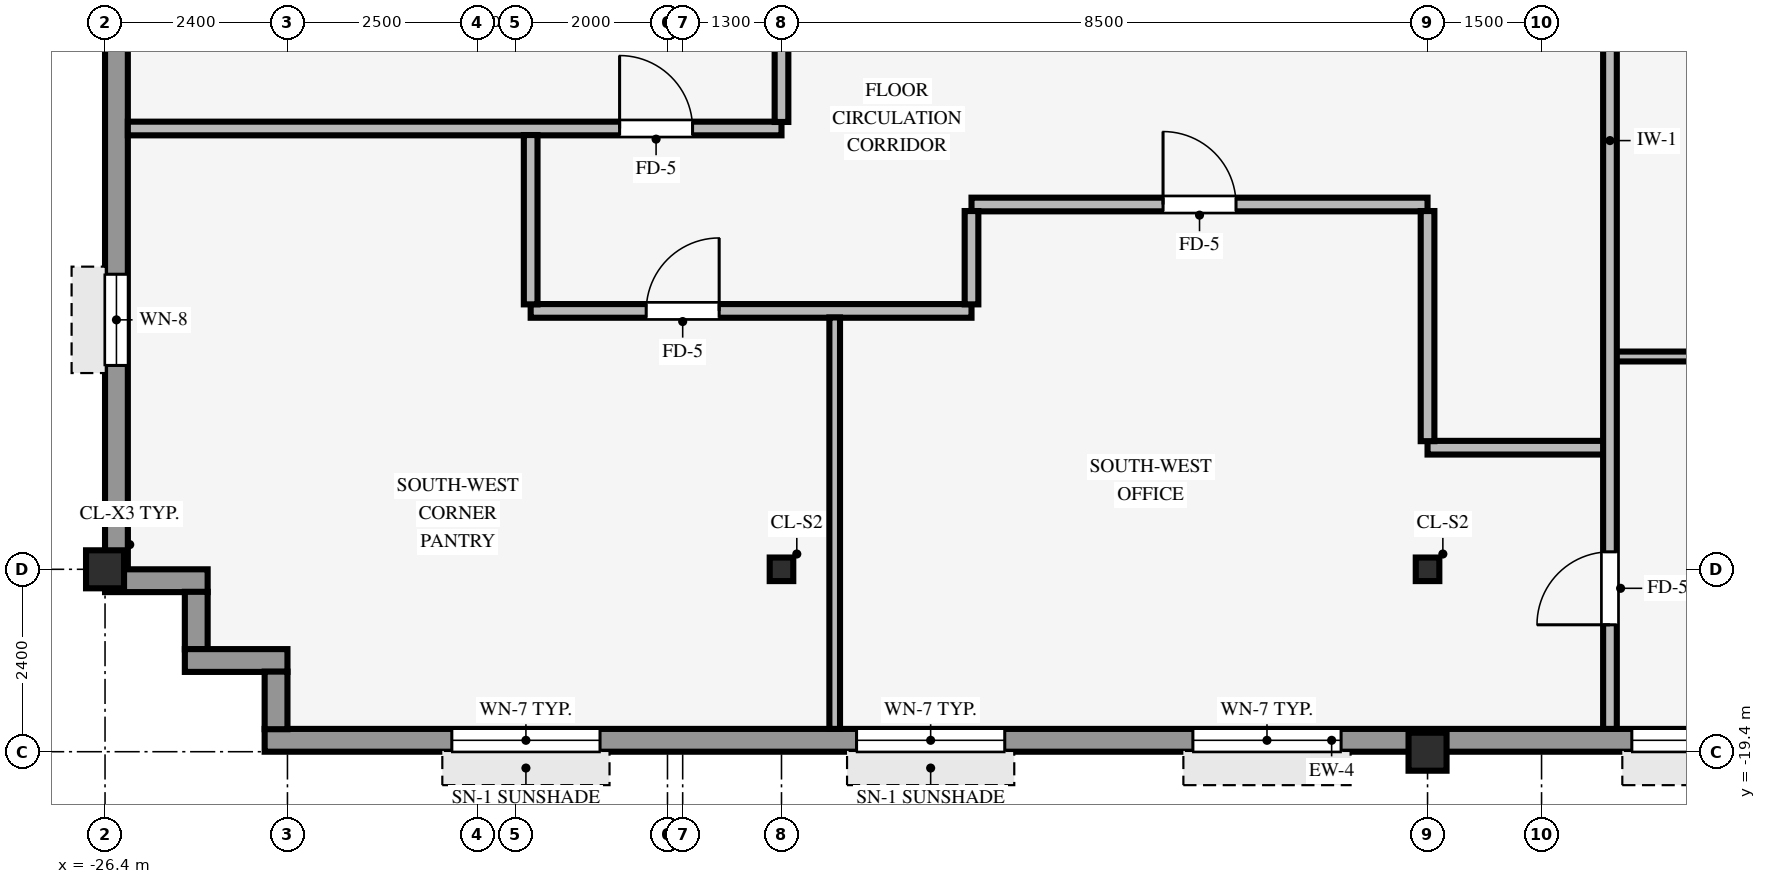
"""IFC4 building model, lengths in metres.
Left out: names, types, materials, properties, quantities, classifications, styles, units other than length and angle.
Written with IfcOpenShell. Run it as: python <this file> out.ifc"""

import sys

from ifc_helpers import new_model, si_unit, direction, frame, frame_2d, origin, origin_2d, place, context, subcontext, project, spatial, rectangle, hollow_rectangle, i_section, extrude, source, transform, mapped, element, fill, save


model = new_model("IFC4")
c1 = context("Model", 3, precision=1e-05, world=origin(), true_north=direction((0.0, 1.0)))
c2 = subcontext(c1, "Body", "Model", "MODEL_VIEW")
j1 = project(units=[si_unit("LENGTHUNIT", "METRE"), si_unit("PLANEANGLEUNIT", "RADIAN")], contexts=[c1])
p1 = place(None, origin())
s1 = spatial("IfcSite", under=j1, at=p1, CompositionType="ELEMENT")
p2 = place(p1, origin())
s2 = spatial("IfcBuilding", under=s1, at=p2, CompositionType="ELEMENT")
p3 = place(p2, frame((0.0, 0.0, 231.05)))
s3 = spatial("IfcBuildingStorey", under=s2, at=p3, CompositionType="ELEMENT", Elevation=231.05)
for number, where, z_axis, x_axis in (
    (1, (-26.4, -17.0, 0.0), (0.0, 0.0, 1.0), (1.0, 0.0, 0.0)),
    (2, (-9.0, -19.4, 0.0), (0.0, 0.0, 1.0), (1.0, 0.0, 0.0)),
):
    element("IfcColumn", number, at=place(p3, frame(where, z_axis=z_axis, x_axis=x_axis)), inside=s3, PredefinedType="COLUMN", context=c2, shape_type="SweptSolid", body=[
        extrude(hollow_rectangle(XDim=0.5, YDim=0.5, WallThickness=0.032, InnerFilletRadius=0.032, OuterFilletRadius=0.064, at=origin_2d()), origin(), (0.0, 0.0, 1.0), 3.37),
    ])
for number, where, z_axis, x_axis in (
    (3, (-17.5, -17.0, 0.0), (0.0, 0.0, 1.0), (1.0, 0.0, 0.0)),
    (4, (-9.0, -17.0, 0.0), (0.0, 0.0, 1.0), (1.0, 0.0, 0.0)),
):
    element("IfcColumn", number, at=place(p3, frame(where, z_axis=z_axis, x_axis=x_axis)), inside=s3, PredefinedType="COLUMN", context=c2, shape_type="SweptSolid", body=[
        extrude(i_section(OverallWidth=0.31, OverallDepth=0.31, WebThickness=0.015, FlangeThickness=0.015, FilletRadius=0.015, at=origin_2d()), origin(), (0.0, 0.0, 1.0), 3.37),
    ])
p4 = place(p3, frame((-24.3, -19.25, 0.0), z_axis=(0.0, 0.0, 1.0), x_axis=(1.0, 0.0, 0.0)))
e5 = element("IfcWall", 5, at=p4, inside=s3, PredefinedType="STANDARD", context=c2, shape_type="SweptSolid", body=[
    extrude(rectangle(XDim=41.0, YDim=0.3, at=frame_2d((20.5, 0.0))), origin(), (0.0, 0.0, 1.0), 2.705),
])
p5 = place(p4, frame((29.55, 0.0, 0.0), z_axis=(0.0, 0.0, 1.0), x_axis=(-1.0, 0.0, 0.0)))
e6 = element("IfcOpeningElement", 6, at=p5, cuts=e5, PredefinedType="OPENING", context=c2, shape_type="SweptSolid", body=[
    extrude(rectangle(XDim=1.05, YDim=2.1, at=frame_2d((0.525, 1.05))), frame((0.0, 0.16, 0.0), z_axis=(0.0, -1.0, 0.0), x_axis=(1.0, 0.0, 0.0)), (0.0, 0.0, 1.0), 0.32),
])
p6 = place(p4, frame((2.462, 0.0, 0.8)))
e7 = element("IfcOpeningElement", 7, at=p6, cuts=e5, PredefinedType="OPENING", context=c2, shape_type="SweptSolid", body=[
    extrude(rectangle(XDim=1.95, YDim=1.48, at=frame_2d((0.975, 0.74))), frame((0.0, 0.16, 0.0), z_axis=(0.0, -1.0, 0.0), x_axis=(1.0, 0.0, 0.0)), (0.0, 0.0, 1.0), 0.32),
])
p7 = place(p4, frame((7.788, 0.0, 0.8)))
e8 = element("IfcOpeningElement", 8, at=p7, cuts=e5, PredefinedType="OPENING", context=c2, shape_type="SweptSolid", body=[
    extrude(rectangle(XDim=1.95, YDim=1.48, at=frame_2d((0.975, 0.74))), frame((0.0, 0.16, 0.0), z_axis=(0.0, -1.0, 0.0), x_axis=(1.0, 0.0, 0.0)), (0.0, 0.0, 1.0), 0.32),
])
p8 = place(p4, frame((12.212, 0.0, 0.8)))
e9 = element("IfcOpeningElement", 9, at=p8, cuts=e5, PredefinedType="OPENING", context=c2, shape_type="SweptSolid", body=[
    extrude(rectangle(XDim=1.95, YDim=1.48, at=frame_2d((0.975, 0.74))), frame((0.0, 0.16, 0.0), z_axis=(0.0, -1.0, 0.0), x_axis=(1.0, 0.0, 0.0)), (0.0, 0.0, 1.0), 0.32),
])
p9 = place(p4, frame((17.988, 0.0, 0.8)))
e10 = element("IfcOpeningElement", 10, at=p9, cuts=e5, PredefinedType="OPENING", context=c2, shape_type="SweptSolid", body=[
    extrude(rectangle(XDim=1.95, YDim=1.48, at=frame_2d((0.975, 0.74))), frame((0.0, 0.16, 0.0), z_axis=(0.0, -1.0, 0.0), x_axis=(1.0, 0.0, 0.0)), (0.0, 0.0, 1.0), 0.32),
])
p10 = place(p4, frame((21.512, 0.0, 0.8)))
e11 = element("IfcOpeningElement", 11, at=p10, cuts=e5, PredefinedType="OPENING", context=c2, shape_type="SweptSolid", body=[
    extrude(rectangle(XDim=1.95, YDim=1.48, at=frame_2d((0.975, 0.74))), frame((0.0, 0.16, 0.0), z_axis=(0.0, -1.0, 0.0), x_axis=(1.0, 0.0, 0.0)), (0.0, 0.0, 1.0), 0.32),
])
p11 = place(p4, frame((25.938, 0.0, 0.8)))
e12 = element("IfcOpeningElement", 12, at=p11, cuts=e5, PredefinedType="OPENING", context=c2, shape_type="SweptSolid", body=[
    extrude(rectangle(XDim=1.95, YDim=1.48, at=frame_2d((0.975, 0.74))), frame((0.0, 0.16, 0.0), z_axis=(0.0, -1.0, 0.0), x_axis=(1.0, 0.0, 0.0)), (0.0, 0.0, 1.0), 0.32),
])
p12 = place(p4, frame((36.587, 0.0, 0.8)))
e13 = element("IfcOpeningElement", 13, at=p12, cuts=e5, PredefinedType="OPENING", context=c2, shape_type="SweptSolid", body=[
    extrude(rectangle(XDim=1.95, YDim=1.48, at=frame_2d((0.975, 0.74))), frame((0.0, 0.16, 0.0), z_axis=(0.0, -1.0, 0.0), x_axis=(1.0, 0.0, 0.0)), (0.0, 0.0, 1.0), 0.32),
])
p13 = place(p3, frame((-26.25, -17.004, 0.0), z_axis=(0.0, 0.0, 1.0), x_axis=(0.0, 1.0, 0.0)))
e14 = element("IfcWall", 14, at=p13, inside=s3, PredefinedType="STANDARD", context=c2, shape_type="SweptSolid", body=[
    extrude(rectangle(XDim=34.008, YDim=0.3, at=frame_2d((17.004, 0.0))), origin(), (0.0, 0.0, 1.0), 2.705),
])
p14 = place(p13, frame((2.686, 0.0, 0.8)))
e15 = element("IfcOpeningElement", 15, at=p14, cuts=e14, PredefinedType="OPENING", context=c2, shape_type="SweptSolid", body=[
    extrude(rectangle(XDim=1.2, YDim=1.48, at=frame_2d((0.6, 0.74))), frame((0.0, 0.16, 0.0), z_axis=(0.0, -1.0, 0.0), x_axis=(1.0, 0.0, 0.0)), (0.0, 0.0, 1.0), 0.32),
])
p15 = place(p13, frame((8.159, 0.0, 0.8)))
e16 = element("IfcOpeningElement", 16, at=p15, cuts=e14, PredefinedType="OPENING", context=c2, shape_type="SweptSolid", body=[
    extrude(rectangle(XDim=1.2, YDim=1.48, at=frame_2d((0.6, 0.74))), frame((0.0, 0.16, 0.0), z_axis=(0.0, -1.0, 0.0), x_axis=(1.0, 0.0, 0.0)), (0.0, 0.0, 1.0), 0.32),
])
p16 = place(p13, frame((11.831, 0.0, 0.8)))
e17 = element("IfcOpeningElement", 17, at=p16, cuts=e14, PredefinedType="OPENING", context=c2, shape_type="SweptSolid", body=[
    extrude(rectangle(XDim=1.2, YDim=1.48, at=frame_2d((0.6, 0.74))), frame((0.0, 0.16, 0.0), z_axis=(0.0, -1.0, 0.0), x_axis=(1.0, 0.0, 0.0)), (0.0, 0.0, 1.0), 0.32),
])
p17 = place(p13, frame((17.754, 0.0, 0.8)))
e18 = element("IfcOpeningElement", 18, at=p17, cuts=e14, PredefinedType="OPENING", context=c2, shape_type="SweptSolid", body=[
    extrude(rectangle(XDim=1.2, YDim=1.48, at=frame_2d((0.6, 0.74))), frame((0.0, 0.16, 0.0), z_axis=(0.0, -1.0, 0.0), x_axis=(1.0, 0.0, 0.0)), (0.0, 0.0, 1.0), 0.32),
])
p18 = place(p13, frame((20.977, 0.0, 0.8)))
e19 = element("IfcOpeningElement", 19, at=p18, cuts=e14, PredefinedType="OPENING", context=c2, shape_type="SweptSolid", body=[
    extrude(rectangle(XDim=1.2, YDim=1.48, at=frame_2d((0.6, 0.74))), frame((0.0, 0.16, 0.0), z_axis=(0.0, -1.0, 0.0), x_axis=(1.0, 0.0, 0.0)), (0.0, 0.0, 1.0), 0.32),
])
p19 = place(p13, frame((24.649, 0.0, 0.8)))
e20 = element("IfcOpeningElement", 20, at=p19, cuts=e14, PredefinedType="OPENING", context=c2, shape_type="SweptSolid", body=[
    extrude(rectangle(XDim=1.2, YDim=1.48, at=frame_2d((0.6, 0.74))), frame((0.0, 0.16, 0.0), z_axis=(0.0, -1.0, 0.0), x_axis=(1.0, 0.0, 0.0)), (0.0, 0.0, 1.0), 0.32),
])
p20 = place(p13, frame((30.122, 0.0, 0.8)))
e21 = element("IfcOpeningElement", 21, at=p20, cuts=e14, PredefinedType="OPENING", context=c2, shape_type="SweptSolid", body=[
    extrude(rectangle(XDim=1.2, YDim=1.48, at=frame_2d((0.6, 0.74))), frame((0.0, 0.16, 0.0), z_axis=(0.0, -1.0, 0.0), x_axis=(1.0, 0.0, 0.0)), (0.0, 0.0, 1.0), 0.32),
])
p21 = place(p3, frame((-26.4, -17.15, 0.0), z_axis=(0.0, 0.0, 1.0), x_axis=(1.0, 0.0, 0.0)))
e22 = element("IfcWall", 22, at=p21, inside=s3, PredefinedType="STANDARD", context=c2, shape_type="SweptSolid", body=[
    extrude(rectangle(XDim=1.35, YDim=0.3, at=frame_2d((0.675, 0.0))), origin(), (0.0, 0.0, 1.0), 2.892),
])
p22 = place(p3, frame((-25.2, -18.054, 0.0), z_axis=(0.0, 0.0, 1.0), x_axis=(0.0, 1.0, 0.0)))
e23 = element("IfcWall", 23, at=p22, inside=s3, PredefinedType="STANDARD", context=c2, shape_type="SweptSolid", body=[
    extrude(rectangle(XDim=0.758, YDim=0.3, at=frame_2d((0.379, 0.0))), origin(), (0.0, 0.0, 1.0), 2.892),
])
p23 = place(p3, frame((-25.35, -18.2, 0.0), z_axis=(0.0, 0.0, 1.0), x_axis=(1.0, 0.0, 0.0)))
e24 = element("IfcWall", 24, at=p23, inside=s3, PredefinedType="STANDARD", context=c2, shape_type="SweptSolid", body=[
    extrude(rectangle(XDim=1.35, YDim=0.3, at=frame_2d((0.675, 0.0))), origin(), (0.0, 0.0, 1.0), 2.892),
])
p24 = place(p3, frame((-24.15, -19.104, 0.0), z_axis=(0.0, 0.0, 1.0), x_axis=(0.0, 1.0, 0.0)))
e25 = element("IfcWall", 25, at=p24, inside=s3, PredefinedType="STANDARD", context=c2, shape_type="SweptSolid", body=[
    extrude(rectangle(XDim=0.758, YDim=0.3, at=frame_2d((0.379, 0.0))), origin(), (0.0, 0.0, 1.0), 2.892),
])
p25 = place(p3, frame((-9.0, -15.4, 0.0), z_axis=(0.0, 0.0, 1.0), x_axis=(1.0, 0.0, 0.0)))
e26 = element("IfcWall", 26, at=p25, inside=s3, PredefinedType="PARTITIONING", context=c2, shape_type="SweptSolid", body=[
    extrude(rectangle(XDim=2.339, YDim=0.18, at=frame_2d((1.169, 0.0))), origin(), (0.0, 0.0, 1.0), 3.36),
])
p26 = place(p3, frame((-6.539, -14.2, 0.0), z_axis=(0.0, 0.0, 1.0), x_axis=(1.0, 0.0, 0.0)))
e27 = element("IfcWall", 27, at=p26, inside=s3, PredefinedType="PARTITIONING", context=c2, shape_type="SweptSolid", body=[
    extrude(rectangle(XDim=13.078, YDim=0.13, at=frame_2d((6.539, 0.0))), origin(), (0.0, 0.0, 1.0), 3.36),
])
p27 = place(p3, frame((-20.8, -13.6, 0.0), z_axis=(0.0, 0.0, 1.0), x_axis=(1.0, 0.0, 0.0)))
e28 = element("IfcWall", 28, at=p27, inside=s3, PredefinedType="PARTITIONING", context=c2, shape_type="SweptSolid", body=[
    extrude(rectangle(XDim=5.8, YDim=0.18, at=frame_2d((2.9, 0.0))), origin(), (0.0, 0.0, 1.0), 3.049),
])
p28 = place(p27, frame((1.52, 0.0, 0.0)))
e29 = element("IfcOpeningElement", 29, at=p28, cuts=e28, PredefinedType="OPENING", context=c2, shape_type="SweptSolid", body=[
    extrude(rectangle(XDim=0.96, YDim=2.1, at=frame_2d((0.48, 1.05))), frame((0.0, 0.1, 0.0), z_axis=(0.0, -1.0, 0.0), x_axis=(1.0, 0.0, 0.0)), (0.0, 0.0, 1.0), 0.2),
])
p29 = place(p3, frame((-15.0, -12.2, 0.0), z_axis=(0.0, 0.0, 1.0), x_axis=(1.0, 0.0, 0.0)))
e30 = element("IfcWall", 30, at=p29, inside=s3, PredefinedType="PARTITIONING", context=c2, shape_type="SweptSolid", body=[
    extrude(rectangle(XDim=6.0, YDim=0.18, at=frame_2d((3.0, 0.0))), origin(), (0.0, 0.0, 1.0), 3.36),
])
p30 = place(p29, frame((2.52, 0.0, 0.0)))
e31 = element("IfcOpeningElement", 31, at=p30, cuts=e30, PredefinedType="OPENING", context=c2, shape_type="SweptSolid", body=[
    extrude(rectangle(XDim=0.96, YDim=2.1, at=frame_2d((0.48, 1.05))), frame((0.0, 0.1, 0.0), z_axis=(0.0, -1.0, 0.0), x_axis=(1.0, 0.0, 0.0)), (0.0, 0.0, 1.0), 0.2),
])
p31 = place(p3, frame((-26.1, -11.2, 0.0), z_axis=(0.0, 0.0, 1.0), x_axis=(1.0, 0.0, 0.0)))
e32 = element("IfcWall", 32, at=p31, inside=s3, PredefinedType="PARTITIONING", context=c2, shape_type="SweptSolid", body=[
    extrude(rectangle(XDim=8.6, YDim=0.18, at=frame_2d((4.3, 0.0))), origin(), (0.0, 0.0, 1.0), 3.36),
])
p32 = place(p31, frame((6.47, 0.0, 0.0)))
e33 = element("IfcOpeningElement", 33, at=p32, cuts=e32, PredefinedType="OPENING", context=c2, shape_type="SweptSolid", body=[
    extrude(rectangle(XDim=0.96, YDim=2.1, at=frame_2d((0.48, 1.05))), frame((0.0, 0.1, 0.0), z_axis=(0.0, -1.0, 0.0), x_axis=(1.0, 0.0, 0.0)), (0.0, 0.0, 1.0), 0.2),
])
p33 = place(p3, frame((-20.8, -13.514, 0.0), z_axis=(0.0, 0.0, 1.0), x_axis=(0.0, 1.0, 0.0)))
e34 = element("IfcWall", 34, at=p33, inside=s3, PredefinedType="PARTITIONING", context=c2, shape_type="SweptSolid", body=[
    extrude(rectangle(XDim=2.228, YDim=0.18, at=frame_2d((1.114, 0.0))), origin(), (0.0, 0.0, 1.0), 3.36),
])
p34 = place(p3, frame((-17.5, -11.114, 0.0), z_axis=(0.0, 0.0, 1.0), x_axis=(0.0, 1.0, 0.0)))
e35 = element("IfcWall", 35, at=p34, inside=s3, PredefinedType="PARTITIONING", context=c2, shape_type="SweptSolid", body=[
    extrude(rectangle(XDim=1.118, YDim=0.18, at=frame_2d((0.559, 0.0))), origin(), (0.0, 0.0, 1.0), 2.892),
])
p35 = place(p3, frame((-16.8, -19.1, 0.0), z_axis=(0.0, 0.0, 1.0), x_axis=(0.0, 1.0, 0.0)))
e36 = element("IfcWall", 36, at=p35, inside=s3, PredefinedType="PARTITIONING", context=c2, shape_type="SweptSolid", body=[
    extrude(rectangle(XDim=5.414, YDim=0.14, at=frame_2d((2.707, 0.0))), origin(), (0.0, 0.0, 1.0), 3.36),
])
p36 = place(p3, frame((-15.0, -13.514, 0.0), z_axis=(0.0, 0.0, 1.0), x_axis=(0.0, 1.0, 0.0)))
e37 = element("IfcWall", 37, at=p36, inside=s3, PredefinedType="PARTITIONING", context=c2, shape_type="SweptSolid", body=[
    extrude(rectangle(XDim=1.228, YDim=0.18, at=frame_2d((0.614, 0.0))), origin(), (0.0, 0.0, 1.0), 3.36),
])
p37 = place(p3, frame((-9.0, -15.314, 0.0), z_axis=(0.0, 0.0, 1.0), x_axis=(0.0, 1.0, 0.0)))
e38 = element("IfcWall", 38, at=p37, inside=s3, PredefinedType="PARTITIONING", context=c2, shape_type="SweptSolid", body=[
    extrude(rectangle(XDim=3.028, YDim=0.18, at=frame_2d((1.514, 0.0))), origin(), (0.0, 0.0, 1.0), 2.892),
])
p38 = place(p3, frame((-6.6, -19.1, 0.0), z_axis=(0.0, 0.0, 1.0), x_axis=(0.0, 1.0, 0.0)))
e39 = element("IfcWall", 39, at=p38, inside=s3, PredefinedType="PARTITIONING", context=c2, shape_type="SweptSolid", body=[
    extrude(rectangle(XDim=17.764, YDim=0.18, at=frame_2d((8.882, 0.0))), origin(), (0.0, 0.0, 1.0), 3.36),
])
p39 = place(p38, frame((13.152, 0.0, 0.0)))
e40 = element("IfcOpeningElement", 40, at=p39, cuts=e39, PredefinedType="OPENING", context=c2, shape_type="SweptSolid", body=[
    extrude(rectangle(XDim=0.96, YDim=2.1, at=frame_2d((0.48, 1.05))), frame((0.0, 0.1, 0.0), z_axis=(0.0, -1.0, 0.0), x_axis=(1.0, 0.0, 0.0)), (0.0, 0.0, 1.0), 0.2),
])
p40 = place(p38, frame((1.37, 0.0, 0.0)))
e41 = element("IfcOpeningElement", 41, at=p40, cuts=e39, PredefinedType="OPENING", context=c2, shape_type="SweptSolid", body=[
    extrude(rectangle(XDim=0.96, YDim=2.1, at=frame_2d((0.48, 1.05))), frame((0.0, 0.1, 0.0), z_axis=(0.0, -1.0, 0.0), x_axis=(1.0, 0.0, 0.0)), (0.0, 0.0, 1.0), 0.2),
])
m1 = source(origin(), c2, "Body", "SweptSolid", [
    extrude(rectangle(XDim=1.95, YDim=1.48, at=frame_2d((0.975, 0.74))), frame((0.0, 0.03, 0.0), z_axis=(0.0, -1.0, 0.0), x_axis=(1.0, 0.0, 0.0)), (0.0, 0.0, 1.0), 0.06),
])
p41 = place(p6, origin())
e42 = element("IfcWindow", 42, at=p41, inside=s3, PartitioningType="SINGLE_PANEL", PredefinedType="WINDOW", context=c2, shape_type="MappedRepresentation", body=[
    mapped(m1, transform((0.0, 0.0, 0.0), scale=1.0)),
])
fill(e7, e42)
p42 = place(p7, origin())
e43 = element("IfcWindow", 43, at=p42, inside=s3, PartitioningType="SINGLE_PANEL", PredefinedType="WINDOW", context=c2, shape_type="MappedRepresentation", body=[
    mapped(m1, transform((0.0, 0.0, 0.0), scale=1.0)),
])
fill(e8, e43)
p43 = place(p8, origin())
e44 = element("IfcWindow", 44, at=p43, inside=s3, PartitioningType="SINGLE_PANEL", PredefinedType="WINDOW", context=c2, shape_type="MappedRepresentation", body=[
    mapped(m1, transform((0.0, 0.0, 0.0), scale=1.0)),
])
fill(e9, e44)
p44 = place(p9, origin())
e45 = element("IfcWindow", 45, at=p44, inside=s3, PartitioningType="SINGLE_PANEL", PredefinedType="WINDOW", context=c2, shape_type="MappedRepresentation", body=[
    mapped(m1, transform((0.0, 0.0, 0.0), scale=1.0)),
])
fill(e10, e45)
m2 = source(origin(), c2, "Body", "SweptSolid", [
    extrude(rectangle(XDim=1.2, YDim=1.48, at=frame_2d((0.6, 0.74))), frame((0.0, 0.03, 0.0), z_axis=(0.0, -1.0, 0.0), x_axis=(1.0, 0.0, 0.0)), (0.0, 0.0, 1.0), 0.06),
])
p45 = place(p14, origin())
e46 = element("IfcWindow", 46, at=p45, inside=s3, PartitioningType="SINGLE_PANEL", PredefinedType="WINDOW", context=c2, shape_type="MappedRepresentation", body=[
    mapped(m2, transform((0.0, 0.0, 0.0), scale=1.0)),
])
fill(e15, e46)
m3 = source(origin(), c2, "Body", "SweptSolid", [
    extrude(rectangle(XDim=0.96, YDim=2.1, at=frame_2d((0.48, 1.05))), frame((0.0, 0.025, 0.0), z_axis=(0.0, -1.0, 0.0), x_axis=(1.0, 0.0, 0.0)), (0.0, 0.0, 1.0), 0.05),
])
p46 = place(p30, origin())
e47 = element("IfcDoor", 47, at=p46, inside=s3, OperationType="SINGLE_SWING_LEFT", PredefinedType="DOOR", context=c2, shape_type="MappedRepresentation", body=[
    mapped(m3, transform((0.0, 0.0, 0.0), scale=1.0)),
])
fill(e31, e47)
p47 = place(p28, origin())
e48 = element("IfcDoor", 48, at=p47, inside=s3, OperationType="SINGLE_SWING_RIGHT", PredefinedType="DOOR", context=c2, shape_type="MappedRepresentation", body=[
    mapped(m3, transform((0.0, 0.0, 0.0), scale=1.0)),
])
fill(e29, e48)
p48 = place(p32, origin())
e49 = element("IfcDoor", 49, at=p48, inside=s3, OperationType="SINGLE_SWING_LEFT", PredefinedType="DOOR", context=c2, shape_type="MappedRepresentation", body=[
    mapped(m3, transform((0.0, 0.0, 0.0), scale=1.0)),
])
fill(e33, e49)
p49 = place(p40, origin())
e50 = element("IfcDoor", 50, at=p49, inside=s3, OperationType="SINGLE_SWING_LEFT", PredefinedType="DOOR", context=c2, shape_type="MappedRepresentation", body=[
    mapped(m3, transform((0.0, 0.0, 0.0), scale=1.0)),
])
fill(e41, e50)
save(model, sys.argv[1])
